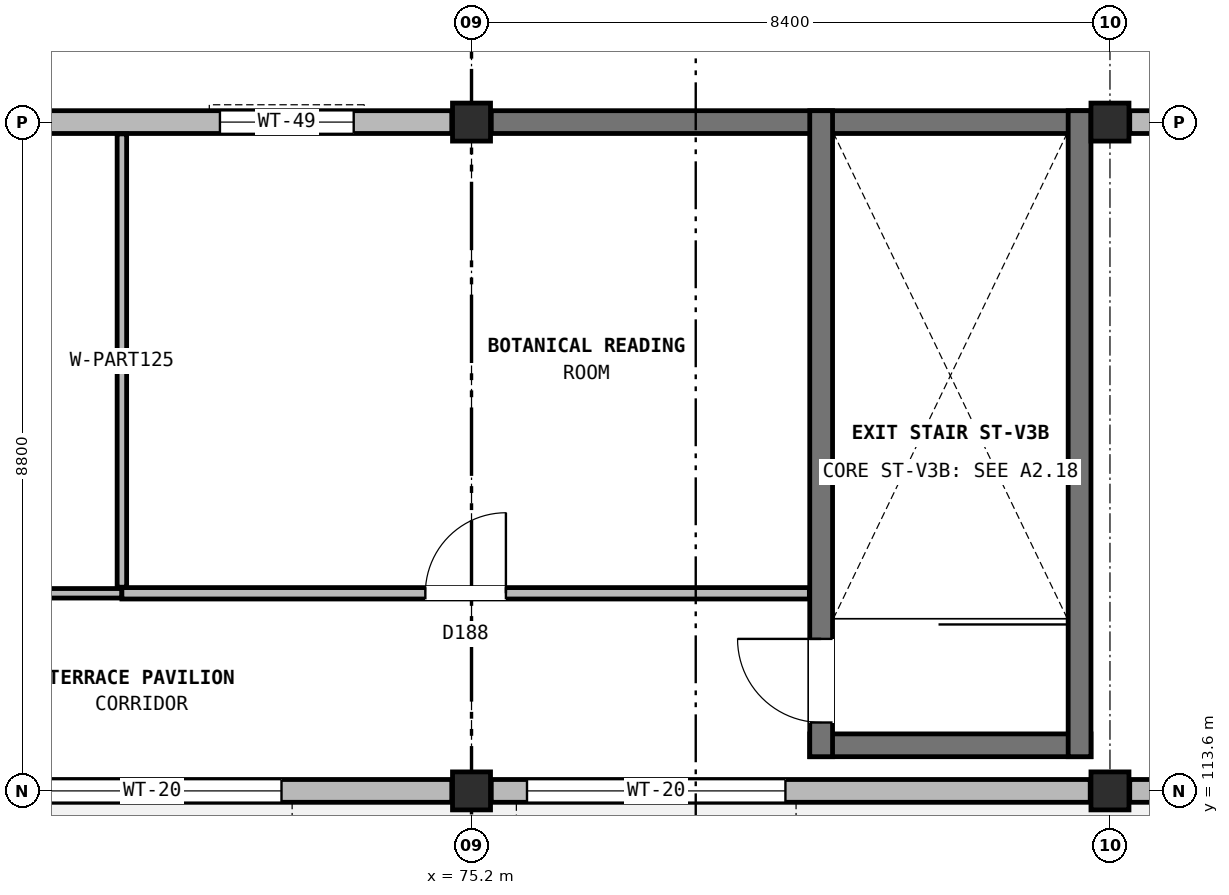
"""IFC4 building model, lengths in metres.
Left out: names, types, materials, properties, quantities, classifications, styles, units other than length and angle.
Written with IfcOpenShell. Run it as: python <this file> out.ifc"""

import sys

from ifc_helpers import new_model, si_unit, direction, frame, frame_2d, origin, origin_2d, place, context, subcontext, project, spatial, rectangle, extrude, element, fill, save


model = new_model("IFC4")
c1 = context("Model", 3, precision=1e-05, world=origin(), true_north=direction((0.0, 1.0)))
c2 = subcontext(c1, "Body", "Model", "MODEL_VIEW")
j1 = project(units=[si_unit("LENGTHUNIT", "METRE"), si_unit("PLANEANGLEUNIT", "RADIAN")], contexts=[c1])
p1 = place(None, origin())
s1 = spatial("IfcSite", under=j1, at=p1, CompositionType="ELEMENT")
p2 = place(p1, origin())
s2 = spatial("IfcBuilding", under=s1, at=p2, CompositionType="ELEMENT")
p3 = place(p2, frame((0.0, 0.0, 13.2)))
s3 = spatial("IfcBuildingStorey", under=s2, at=p3, CompositionType="ELEMENT", Elevation=13.2)
for number, where, z_axis, x_axis in (
    (1, (75.2, 113.6, 0.0), (0.0, 0.0, 1.0), (1.0, 0.0, 0.0)),
    (2, (75.2, 122.4, 0.0), (0.0, 0.0, 1.0), (1.0, 0.0, 0.0)),
    (3, (83.6, 113.6, 0.0), (0.0, 0.0, 1.0), (1.0, 0.0, 0.0)),
    (4, (83.6, 122.4, 0.0), (0.0, 0.0, 1.0), (1.0, 0.0, 0.0)),
):
    element("IfcColumn", number, at=place(p3, frame(where, z_axis=z_axis, x_axis=x_axis)), inside=s3, PredefinedType="COLUMN", context=c2, shape_type="SweptSolid", body=[
        extrude(rectangle(XDim=0.5, YDim=0.5, at=origin_2d()), origin(), (0.0, 0.0, 1.0), 4.0),
    ])
p4 = place(p3, frame((67.06, 113.6, 0.0), z_axis=(0.0, 0.0, 1.0), x_axis=(1.0, 0.0, 0.0)))
e5 = element("IfcWall", 5, at=p4, inside=s3, PredefinedType="SOLIDWALL", context=c2, shape_type="SweptSolid", body=[
    extrude(rectangle(XDim=7.88, YDim=0.3, at=frame_2d((3.94, 0.0))), origin(), (0.0, 0.0, 1.0), 3.35),
])
p5 = place(p4, frame((2.24, 0.0, 0.9)))
e6 = element("IfcOpeningElement", 6, at=p5, cuts=e5, PredefinedType="OPENING", context=c2, shape_type="SweptSolid", body=[
    extrude(rectangle(XDim=3.4, YDim=2.15, at=frame_2d((1.7, 1.075))), frame((0.0, 0.16, 0.0), z_axis=(0.0, -1.0, 0.0), x_axis=(1.0, 0.0, 0.0)), (0.0, 0.0, 1.0), 0.32),
])
p6 = place(p3, frame((75.46, 113.6, 0.0), z_axis=(0.0, 0.0, 1.0), x_axis=(1.0, 0.0, 0.0)))
e7 = element("IfcWall", 7, at=p6, inside=s3, PredefinedType="SOLIDWALL", context=c2, shape_type="SweptSolid", body=[
    extrude(rectangle(XDim=7.88, YDim=0.3, at=frame_2d((3.94, 0.0))), origin(), (0.0, 0.0, 1.0), 3.35),
])
p7 = place(p6, frame((0.47, 0.0, 0.9)))
e8 = element("IfcOpeningElement", 8, at=p7, cuts=e7, PredefinedType="OPENING", context=c2, shape_type="SweptSolid", body=[
    extrude(rectangle(XDim=3.4, YDim=2.15, at=frame_2d((1.7, 1.075))), frame((0.0, 0.16, 0.0), z_axis=(0.0, -1.0, 0.0), x_axis=(1.0, 0.0, 0.0)), (0.0, 0.0, 1.0), 0.32),
])
p8 = place(p3, frame((83.86, 113.6, 0.0), z_axis=(0.0, 0.0, 1.0), x_axis=(1.0, 0.0, 0.0)))
e9 = element("IfcWall", 9, at=p8, inside=s3, PredefinedType="SOLIDWALL", context=c2, shape_type="SweptSolid", body=[
    extrude(rectangle(XDim=7.88, YDim=0.3, at=frame_2d((3.94, 0.0))), origin(), (0.0, 0.0, 1.0), 3.35),
])
p9 = place(p8, frame((3.36, 0.0, 0.9)))
e10 = element("IfcOpeningElement", 10, at=p9, cuts=e9, PredefinedType="OPENING", context=c2, shape_type="SweptSolid", body=[
    extrude(rectangle(XDim=1.16, YDim=1.74, at=frame_2d((0.58, 0.87))), frame((0.0, 0.16, 0.0), z_axis=(0.0, -1.0, 0.0), x_axis=(1.0, 0.0, 0.0)), (0.0, 0.0, 1.0), 0.32),
])
p10 = place(p3, frame((91.74, 122.4, 0.0), z_axis=(0.0, 0.0, 1.0), x_axis=(-1.0, 0.0, 0.0)))
e11 = element("IfcWall", 11, at=p10, inside=s3, PredefinedType="SOLIDWALL", context=c2, shape_type="SweptSolid", body=[
    extrude(rectangle(XDim=7.88, YDim=0.3, at=frame_2d((3.94, 0.0))), origin(), (0.0, 0.0, 1.0), 3.35),
])
p11 = place(p10, frame((3.2, 0.0, 0.9)))
e12 = element("IfcOpeningElement", 12, at=p11, cuts=e11, PredefinedType="OPENING", context=c2, shape_type="SweptSolid", body=[
    extrude(rectangle(XDim=1.48, YDim=1.84, at=frame_2d((0.74, 0.92))), frame((0.0, 0.16, 0.0), z_axis=(0.0, -1.0, 0.0), x_axis=(1.0, 0.0, 0.0)), (0.0, 0.0, 1.0), 0.32),
])
p12 = place(p3, frame((83.34, 122.4, 0.0), z_axis=(0.0, 0.0, 1.0), x_axis=(-1.0, 0.0, 0.0)))
e13 = element("IfcWall", 13, at=p12, inside=s3, PredefinedType="SHEAR", context=c2, shape_type="SweptSolid", body=[
    extrude(rectangle(XDim=7.88, YDim=0.3, at=frame_2d((3.94, 0.0))), origin(), (0.0, 0.0, 1.0), 3.35),
])
p13 = place(p3, frame((74.94, 122.4, 0.0), z_axis=(0.0, 0.0, 1.0), x_axis=(-1.0, 0.0, 0.0)))
e14 = element("IfcWall", 14, at=p13, inside=s3, PredefinedType="SOLIDWALL", context=c2, shape_type="SweptSolid", body=[
    extrude(rectangle(XDim=7.88, YDim=0.3, at=frame_2d((3.94, 0.0))), origin(), (0.0, 0.0, 1.0), 3.35),
])
p14 = place(p13, frame((1.29, 0.0, 0.9)))
e15 = element("IfcOpeningElement", 15, at=p14, cuts=e14, PredefinedType="OPENING", context=c2, shape_type="SweptSolid", body=[
    extrude(rectangle(XDim=1.76, YDim=1.94, at=frame_2d((0.88, 0.97))), frame((0.0, 0.16, 0.0), z_axis=(0.0, -1.0, 0.0), x_axis=(1.0, 0.0, 0.0)), (0.0, 0.0, 1.0), 0.32),
])
p15 = place(p3, frame((79.65, 114.2, 0.0), z_axis=(0.0, 0.0, 1.0), x_axis=(1.0, 0.0, 0.0)))
e16 = element("IfcWall", 16, at=p15, inside=s3, PredefinedType="SHEAR", context=c2, shape_type="SweptSolid", body=[
    extrude(rectangle(XDim=3.7, YDim=0.3, at=frame_2d((1.85, 0.0))), origin(), (0.0, 0.0, 1.0), 4.0),
])
p16 = place(p3, frame((79.8, 114.05, 0.0), z_axis=(0.0, 0.0, 1.0), x_axis=(0.0, 1.0, 0.0)))
e17 = element("IfcWall", 17, at=p16, inside=s3, PredefinedType="SHEAR", context=c2, shape_type="SweptSolid", body=[
    extrude(rectangle(XDim=8.5, YDim=0.3, at=frame_2d((4.25, 0.0))), origin(), (0.0, 0.0, 1.0), 4.0),
])
p17 = place(p16, frame((0.45, 0.0, 0.0)))
e18 = element("IfcOpeningElement", 18, at=p17, cuts=e17, PredefinedType="OPENING", context=c2, shape_type="SweptSolid", body=[
    extrude(rectangle(XDim=1.1, YDim=2.2, at=frame_2d((0.55, 1.1))), frame((0.0, 0.16, 0.0), z_axis=(0.0, -1.0, 0.0), x_axis=(1.0, 0.0, 0.0)), (0.0, 0.0, 1.0), 0.32),
])
p18 = place(p3, frame((83.2, 114.05, 0.0), z_axis=(0.0, 0.0, 1.0), x_axis=(0.0, 1.0, 0.0)))
e19 = element("IfcWall", 19, at=p18, inside=s3, PredefinedType="SHEAR", context=c2, shape_type="SweptSolid", body=[
    extrude(rectangle(XDim=8.5, YDim=0.3, at=frame_2d((4.25, 0.0))), origin(), (0.0, 0.0, 1.0), 4.0),
])
p19 = place(p3, frame((62.6, 116.2, 0.0), z_axis=(0.0, 0.0, 1.0), x_axis=(1.0, 0.0, 0.0)))
e20 = element("IfcWall", 20, at=p19, inside=s3, PredefinedType="PARTITIONING", context=c2, shape_type="SweptSolid", body=[
    extrude(rectangle(XDim=8.0, YDim=0.125, at=frame_2d((4.0, 0.0))), origin(), (0.0, 0.0, 1.0), 3.665),
])
p20 = place(p19, frame((3.51, 0.0, 0.0)))
e21 = element("IfcOpeningElement", 21, at=p20, cuts=e20, PredefinedType="OPENING", context=c2, shape_type="SweptSolid", body=[
    extrude(rectangle(XDim=0.98, YDim=2.1, at=frame_2d((0.49, 1.05))), frame((0.0, 0.073, 0.0), z_axis=(0.0, -1.0, 0.0), x_axis=(1.0, 0.0, 0.0)), (0.0, 0.0, 1.0), 0.145),
])
p21 = place(p3, frame((70.6, 116.2, 0.0), z_axis=(0.0, 0.0, 1.0), x_axis=(1.0, 0.0, 0.0)))
e22 = element("IfcWall", 22, at=p21, inside=s3, PredefinedType="PARTITIONING", context=c2, shape_type="SweptSolid", body=[
    extrude(rectangle(XDim=9.045, YDim=0.15, at=frame_2d((4.522, 0.0))), origin(), (0.0, 0.0, 1.0), 3.665),
])
p22 = place(p21, frame((3.992, 0.0, 0.0)))
e23 = element("IfcOpeningElement", 23, at=p22, cuts=e22, PredefinedType="OPENING", context=c2, shape_type="SweptSolid", body=[
    extrude(rectangle(XDim=1.06, YDim=2.22, at=frame_2d((0.53, 1.11))), frame((0.0, 0.085, 0.0), z_axis=(0.0, -1.0, 0.0), x_axis=(1.0, 0.0, 0.0)), (0.0, 0.0, 1.0), 0.17),
])
p23 = place(p3, frame((70.6, 116.28, 0.0), z_axis=(0.0, 0.0, 1.0), x_axis=(0.0, 1.0, 0.0)))
e24 = element("IfcWall", 24, at=p23, inside=s3, PredefinedType="PARTITIONING", context=c2, shape_type="SweptSolid", body=[
    extrude(rectangle(XDim=5.965, YDim=0.125, at=frame_2d((2.982, 0.0))), origin(), (0.0, 0.0, 1.0), 3.665),
])
p24 = place(p5, origin())
e25 = element("IfcWindow", 25, at=p24, inside=s3, PartitioningType="SINGLE_PANEL", PredefinedType="WINDOW", context=c2, shape_type="SweptSolid", body=[
    extrude(rectangle(XDim=3.4, YDim=2.15, at=frame_2d((1.7, 1.075))), frame((0.0, 0.03, 0.0), z_axis=(0.0, -1.0, 0.0), x_axis=(1.0, 0.0, 0.0)), (0.0, 0.0, 1.0), 0.06),
])
fill(e6, e25)
p25 = place(p7, origin())
e26 = element("IfcWindow", 26, at=p25, inside=s3, PartitioningType="SINGLE_PANEL", PredefinedType="WINDOW", context=c2, shape_type="SweptSolid", body=[
    extrude(rectangle(XDim=3.4, YDim=2.15, at=frame_2d((1.7, 1.075))), frame((0.0, 0.03, 0.0), z_axis=(0.0, -1.0, 0.0), x_axis=(1.0, 0.0, 0.0)), (0.0, 0.0, 1.0), 0.06),
])
fill(e8, e26)
p26 = place(p14, origin())
e27 = element("IfcWindow", 27, at=p26, inside=s3, PartitioningType="SINGLE_PANEL", PredefinedType="WINDOW", context=c2, shape_type="SweptSolid", body=[
    extrude(rectangle(XDim=1.76, YDim=1.94, at=frame_2d((0.88, 0.97))), frame((0.0, 0.03, 0.0), z_axis=(0.0, -1.0, 0.0), x_axis=(1.0, 0.0, 0.0)), (0.0, 0.0, 1.0), 0.06),
])
fill(e15, e27)
p27 = place(p17, origin())
e28 = element("IfcDoor", 28, at=p27, inside=s3, OperationType="SINGLE_SWING_RIGHT", PredefinedType="DOOR", context=c2, shape_type="SweptSolid", body=[
    extrude(rectangle(XDim=1.1, YDim=2.2, at=frame_2d((0.55, 1.1))), frame((0.0, 0.025, 0.0), z_axis=(0.0, -1.0, 0.0), x_axis=(1.0, 0.0, 0.0)), (0.0, 0.0, 1.0), 0.05),
])
fill(e18, e28)
p28 = place(p22, origin())
e29 = element("IfcDoor", 29, at=p28, inside=s3, OperationType="SINGLE_SWING_RIGHT", PredefinedType="DOOR", context=c2, shape_type="SweptSolid", body=[
    extrude(rectangle(XDim=1.06, YDim=2.22, at=frame_2d((0.53, 1.11))), frame((0.0, 0.025, 0.0), z_axis=(0.0, -1.0, 0.0), x_axis=(1.0, 0.0, 0.0)), (0.0, 0.0, 1.0), 0.05),
])
fill(e23, e29)
save(model, sys.argv[1])
